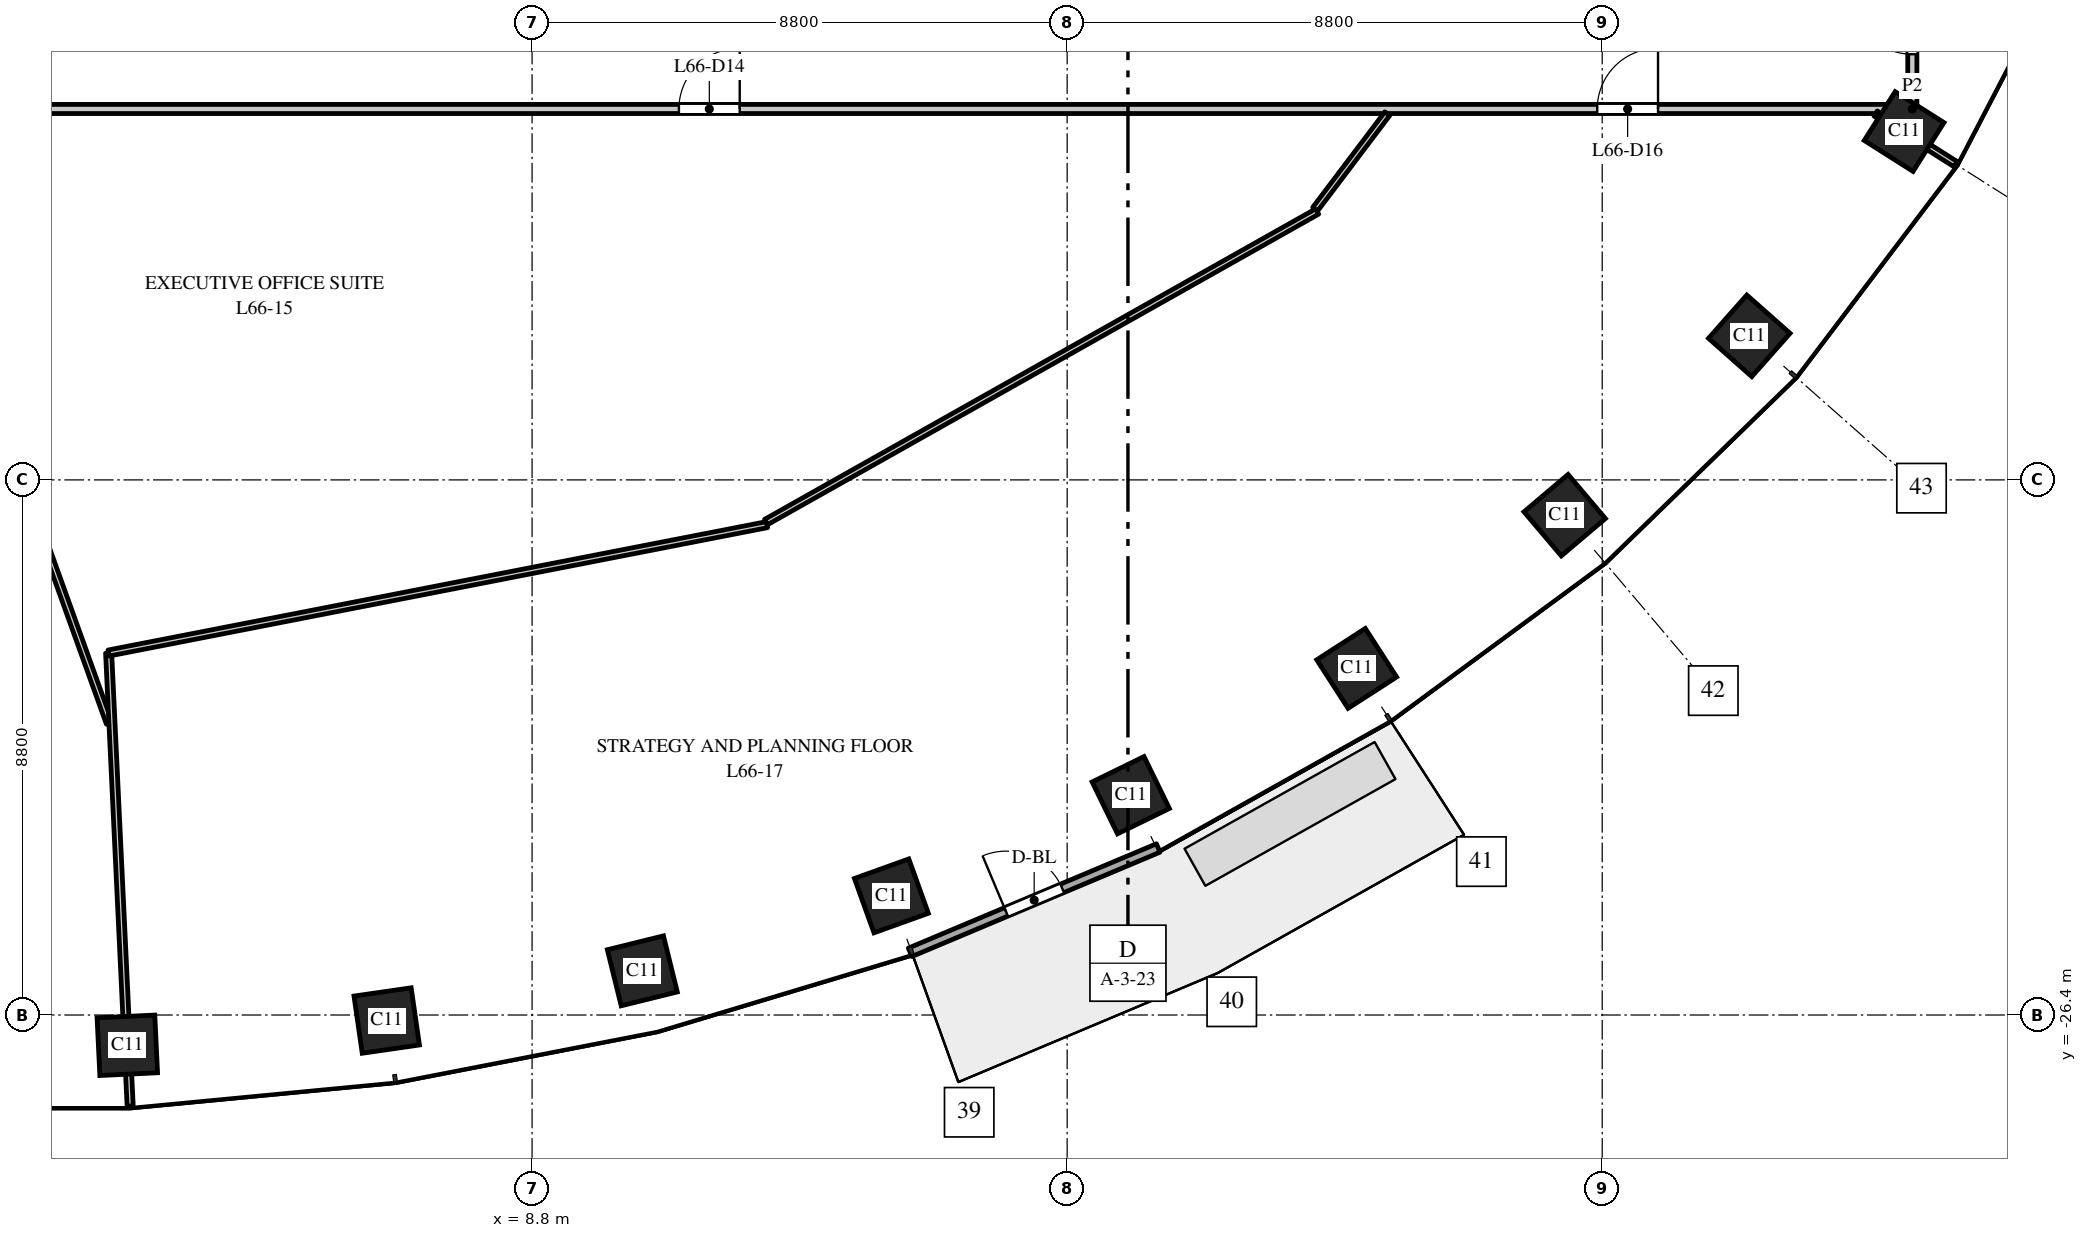
"""IFC4 building model, lengths in metres.
Left out: names, types, materials, properties, quantities, classifications, styles, units other than length and angle.
Written with IfcOpenShell. Run it as: python <this file> out.ifc"""

import sys

from ifc_helpers import new_model, si_unit, direction, frame, frame_2d, origin, origin_2d, place, context, subcontext, project, spatial, rectangle, extrude, element, fill, save


model = new_model("IFC4")
c1 = context("Model", 3, precision=1e-05, world=origin(), true_north=direction((0.0, 1.0)))
c2 = subcontext(c1, "Body", "Model", "MODEL_VIEW")
j1 = project(units=[si_unit("LENGTHUNIT", "METRE"), si_unit("PLANEANGLEUNIT", "RADIAN")], contexts=[c1])
p1 = place(None, origin())
s1 = spatial("IfcSite", under=j1, at=p1, CompositionType="ELEMENT")
p2 = place(p1, origin())
s2 = spatial("IfcBuilding", under=s1, at=p2, CompositionType="ELEMENT")
p3 = place(p2, frame((0.0, 0.0, 307.0)))
s3 = spatial("IfcBuildingStorey", under=s2, at=p3, CompositionType="ELEMENT", Elevation=307.0)
for number, where, z_axis, x_axis in (
    (1, (2.143, -26.898, 0.0), (0.0, 0.0, 1.0), (0.999, 0.048, 0.0)),
    (2, (6.409, -26.491, 0.0), (0.0, 0.0, 1.0), (0.99, 0.143, 0.0)),
    (3, (10.613, -25.674, 0.0), (0.0, 0.0, 1.0), (0.971, 0.24, 0.0)),
    (4, (14.709, -24.441, 0.0), (0.0, 0.0, 1.0), (0.941, 0.338, 0.0)),
    (5, (18.646, -22.785, 0.0), (0.0, 0.0, 1.0), (0.898, 0.439, 0.0)),
    (6, (22.362, -20.7, 0.0), (0.0, 0.0, 1.0), (0.84, 0.542, 0.0)),
    (7, (25.783, -18.18, 0.0), (0.0, 0.0, 1.0), (0.763, 0.646, 0.0)),
    (8, (28.819, -15.23, 0.0), (0.0, 0.0, 1.0), (0.663, 0.749, 0.0)),
    (9, (31.365, -11.871, 0.0), (0.0, 0.0, 1.0), (0.535, 0.845, 0.0)),
):
    element("IfcColumn", number, at=place(p3, frame(where, z_axis=z_axis, x_axis=x_axis)), inside=s3, PredefinedType="COLUMN", context=c2, shape_type="SweptSolid", body=[
        extrude(rectangle(XDim=0.95, YDim=0.95, at=origin_2d()), origin(), (0.0, 0.0, 1.0), 4.0),
    ])
p4 = place(p3, frame((15.018, -25.369, 0.0), z_axis=(0.0, 0.0, 1.0), x_axis=(0.921816985161, 0.387625393736, 0.0)))
e10 = element("IfcWall", 10, at=p4, inside=s3, PredefinedType="STANDARD", context=c2, shape_type="SweptSolid", body=[
    extrude(rectangle(XDim=4.426, YDim=0.15, at=frame_2d((2.213, 0.0))), origin(), (0.0, 0.0, 1.0), 3.7),
])
p5 = place(p4, frame((1.713, 0.0, 0.0)))
e11 = element("IfcOpeningElement", 11, at=p5, cuts=e10, PredefinedType="OPENING", context=c2, shape_type="SweptSolid", body=[
    extrude(rectangle(XDim=1.0, YDim=2.4, at=frame_2d((0.5, 1.2))), frame((0.0, 0.085, 0.0), z_axis=(0.0, -1.0, 0.0), x_axis=(1.0, 0.0, 0.0)), (0.0, 0.0, 1.0), 0.17),
])
p6 = place(p3, frame((-0.01, -16.438, 0.0), z_axis=(0.0, 0.0, 1.0), x_axis=(0.338376018219, -0.941010983089, 0.0)))
e12 = element("IfcWall", 12, at=p6, inside=s3, PredefinedType="PARTITIONING", context=c2, shape_type="SweptSolid", body=[
    extrude(rectangle(XDim=5.488, YDim=0.1, at=frame_2d((2.744, 0.0))), origin(), (0.0, 0.0, 1.0), 3.7),
])
p7 = place(p3, frame((0.315, -11.5, 0.0), z_axis=(0.0, 0.0, 1.0), x_axis=(1.0, 0.0, 0.0)))
e13 = element("IfcWall", 13, at=p7, inside=s3, PredefinedType="PARTITIONING", context=c2, shape_type="SweptSolid", body=[
    extrude(rectangle(XDim=31.185, YDim=0.15, at=frame_2d((15.593, 0.0))), origin(), (0.0, 0.0, 1.0), 2.75),
])
p8 = place(p7, frame((10.9, 0.0, 0.0)))
e14 = element("IfcOpeningElement", 14, at=p8, cuts=e13, PredefinedType="OPENING", context=c2, shape_type="SweptSolid", body=[
    extrude(rectangle(XDim=1.0, YDim=2.1, at=frame_2d((0.5, 1.05))), frame((0.0, 0.085, 0.0), z_axis=(0.0, -1.0, 0.0), x_axis=(1.0, 0.0, 0.0)), (0.0, 0.0, 1.0), 0.17),
])
p9 = place(p7, frame((26.003, 0.0, 0.0)))
e15 = element("IfcOpeningElement", 15, at=p9, cuts=e13, PredefinedType="OPENING", context=c2, shape_type="SweptSolid", body=[
    extrude(rectangle(XDim=1.0, YDim=2.1, at=frame_2d((0.5, 1.05))), frame((0.0, 0.085, 0.0), z_axis=(0.0, -1.0, 0.0), x_axis=(1.0, 0.0, 0.0)), (0.0, 0.0, 1.0), 0.17),
])
p10 = place(p3, frame((1.836, -20.448, 0.0), z_axis=(0.0, 0.0, 1.0), x_axis=(0.04746405939, -0.998872946408, 0.0)))
e16 = element("IfcWall", 16, at=p10, inside=s3, PredefinedType="PARTITIONING", context=c2, shape_type="SweptSolid", body=[
    extrude(rectangle(XDim=7.458, YDim=0.1, at=frame_2d((3.729, 0.0))), origin(), (0.0, 0.0, 1.0), 3.0),
])
p11 = place(p3, frame((1.836, -20.447, 0.0), z_axis=(0.0, 0.0, 1.0), x_axis=(0.98151990149, 0.191360087216, 0.0)))
e17 = element("IfcWall", 17, at=p11, inside=s3, PredefinedType="PARTITIONING", context=c2, shape_type="SweptSolid", body=[
    extrude(rectangle(XDim=11.032, YDim=0.1, at=frame_2d((5.516, 0.0))), origin(), (0.0, 0.0, 1.0), 2.85),
])
p12 = place(p3, frame((12.648, -18.293, 0.0), z_axis=(0.0, 0.0, 1.0), x_axis=(0.871228121457, 0.490878355994, 0.0)))
e18 = element("IfcWall", 18, at=p12, inside=s3, PredefinedType="PARTITIONING", context=c2, shape_type="SweptSolid", body=[
    extrude(rectangle(XDim=10.404, YDim=0.1, at=frame_2d((5.202, 0.0))), origin(), (0.0, 0.0, 1.0), 3.7),
])
p13 = place(p3, frame((21.679, -13.148, 0.0), z_axis=(0.0, 0.0, 1.0), x_axis=(0.602755856466, 0.797925671661, 0.0)))
e19 = element("IfcWall", 19, at=p13, inside=s3, PredefinedType="PARTITIONING", context=c2, shape_type="SweptSolid", body=[
    extrude(rectangle(XDim=1.968, YDim=0.1, at=frame_2d((0.984, 0.0))), origin(), (0.0, 0.0, 1.0), 2.75),
])
p14 = place(p3, frame((30.897, -11.575, 0.0), z_axis=(0.0, 0.0, 1.0), x_axis=(0.844757626245, -0.535149094086, 0.0)))
e20 = element("IfcWall", 20, at=p14, inside=s3, PredefinedType="PARTITIONING", context=c2, shape_type="SweptSolid", body=[
    extrude(rectangle(XDim=1.557, YDim=0.1, at=frame_2d((0.778, 0.0))), origin(), (0.0, 0.0, 1.0), 3.0),
])
p15 = place(p3, frame((31.5, -11.5, 0.0), z_axis=(0.0, 0.0, 1.0), x_axis=(0.0, 1.0, 0.0)))
e21 = element("IfcWall", 21, at=p15, inside=s3, PredefinedType="PARTITIONING", context=c2, shape_type="SweptSolid", body=[
    extrude(rectangle(XDim=3.0, YDim=0.15, at=frame_2d((1.5, 0.0))), origin(), (0.0, 0.0, 1.0), 3.0),
])
p16 = place(p15, frame((0.9, 0.0, 0.0)))
e22 = element("IfcOpeningElement", 22, at=p16, cuts=e21, PredefinedType="OPENING", context=c2, shape_type="SweptSolid", body=[
    extrude(rectangle(XDim=1.0, YDim=2.1, at=frame_2d((0.5, 1.05))), frame((0.0, 0.085, 0.0), z_axis=(0.0, -1.0, 0.0), x_axis=(1.0, 0.0, 0.0)), (0.0, 0.0, 1.0), 0.17),
])
p17 = place(p5, origin())
e23 = element("IfcDoor", 23, at=p17, inside=s3, OperationType="SINGLE_SWING_LEFT", PredefinedType="DOOR", context=c2, shape_type="SweptSolid", body=[
    extrude(rectangle(XDim=1.0, YDim=2.4, at=frame_2d((0.5, 1.2))), frame((0.0, 0.025, 0.0), z_axis=(0.0, -1.0, 0.0), x_axis=(1.0, 0.0, 0.0)), (0.0, 0.0, 1.0), 0.05),
])
fill(e11, e23)
p18 = place(p8, origin())
e24 = element("IfcDoor", 24, at=p18, inside=s3, OperationType="SINGLE_SWING_RIGHT", PredefinedType="DOOR", context=c2, shape_type="SweptSolid", body=[
    extrude(rectangle(XDim=1.0, YDim=2.1, at=frame_2d((0.5, 1.05))), frame((0.0, 0.025, 0.0), z_axis=(0.0, -1.0, 0.0), x_axis=(1.0, 0.0, 0.0)), (0.0, 0.0, 1.0), 0.05),
])
fill(e14, e24)
p19 = place(p9, origin())
e25 = element("IfcDoor", 25, at=p19, inside=s3, OperationType="SINGLE_SWING_RIGHT", PredefinedType="DOOR", context=c2, shape_type="SweptSolid", body=[
    extrude(rectangle(XDim=1.0, YDim=2.1, at=frame_2d((0.5, 1.05))), frame((0.0, 0.025, 0.0), z_axis=(0.0, -1.0, 0.0), x_axis=(1.0, 0.0, 0.0)), (0.0, 0.0, 1.0), 0.05),
])
fill(e15, e25)
p20 = place(p16, origin())
e26 = element("IfcDoor", 26, at=p20, inside=s3, OperationType="SINGLE_SWING_RIGHT", PredefinedType="DOOR", context=c2, shape_type="SweptSolid", body=[
    extrude(rectangle(XDim=1.0, YDim=2.1, at=frame_2d((0.5, 1.05))), frame((0.0, 0.025, 0.0), z_axis=(0.0, -1.0, 0.0), x_axis=(1.0, 0.0, 0.0)), (0.0, 0.0, 1.0), 0.05),
])
fill(e22, e26)
save(model, sys.argv[1])
